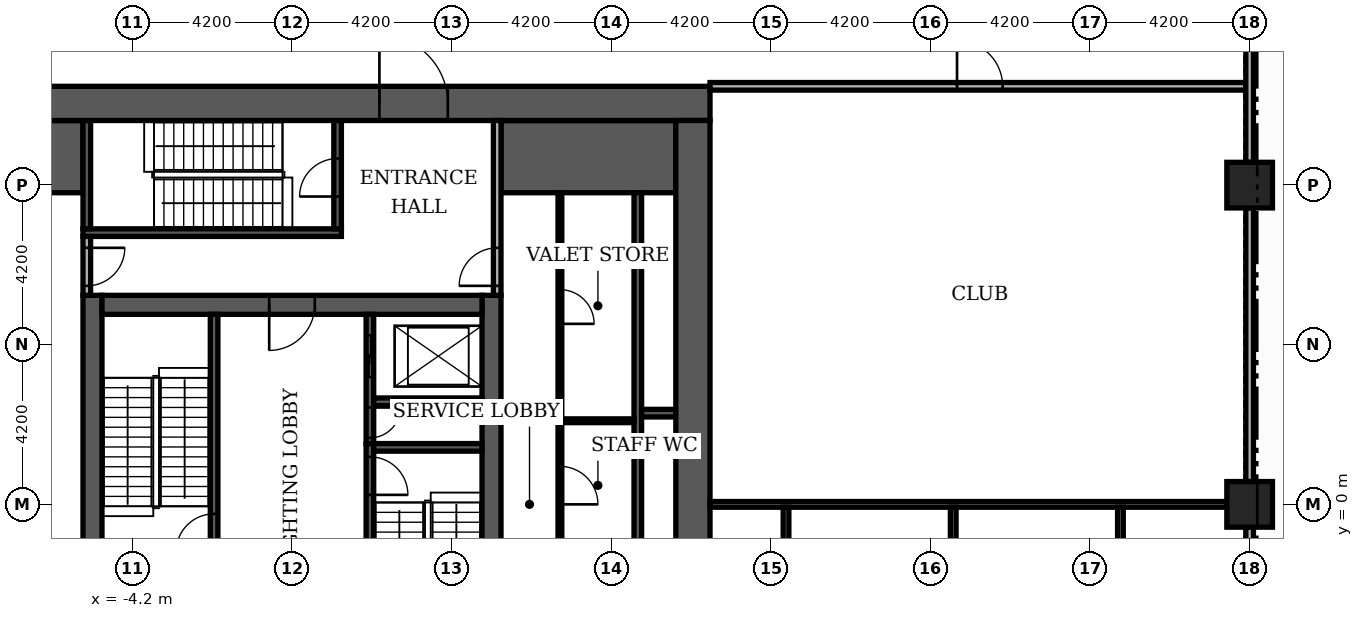
"""IFC4 building model, lengths in metres.
Left out: names, types, materials, properties, quantities, classifications, styles, units other than length and angle.
Written with IfcOpenShell. Run it as: python <this file> out.ifc"""

import sys

from ifc_helpers import new_model, si_unit, direction, frame, frame_2d, origin, origin_2d, place, context, subcontext, project, spatial, rectangle, extrude, element, fill, save


model = new_model("IFC4")
c1 = context("Model", 3, precision=1e-05, world=origin(), true_north=direction((0.0, 1.0)))
c2 = subcontext(c1, "Body", "Model", "MODEL_VIEW")
j1 = project(units=[si_unit("LENGTHUNIT", "METRE"), si_unit("PLANEANGLEUNIT", "RADIAN")], contexts=[c1])
p1 = place(None, origin())
s1 = spatial("IfcSite", under=j1, at=p1, CompositionType="ELEMENT")
p2 = place(p1, origin())
s2 = spatial("IfcBuilding", under=s1, at=p2, CompositionType="ELEMENT")
p3 = place(p2, frame((0.0, 0.0, 7.2)))
s3 = spatial("IfcBuildingStorey", under=s2, at=p3, CompositionType="ELEMENT", Elevation=7.2)
for number, where, z_axis, x_axis in (
    (1, (-5.25, -5.0, 0.0), (0.0, 0.0, 1.0), (0.0, 1.0, 0.0)),
    (2, (5.25, -5.0, 0.0), (0.0, 0.0, 1.0), (0.0, 1.0, 0.0)),
):
    element("IfcWall", number, at=place(p3, frame(where, z_axis=z_axis, x_axis=x_axis)), inside=s3, PredefinedType="SHEAR", context=c2, shape_type="SweptSolid", body=[
        extrude(rectangle(XDim=10.5, YDim=0.5, at=frame_2d((5.25, 0.0))), origin(), (0.0, 0.0, 1.0), 4.38),
    ])
p4 = place(p3, frame((-5.0, 5.25, 0.0), z_axis=(0.0, 0.0, 1.0), x_axis=(1.0, 0.0, 0.0)))
e3 = element("IfcWall", 3, at=p4, inside=s3, PredefinedType="SHEAR", context=c2, shape_type="SweptSolid", body=[
    extrude(rectangle(XDim=10.0, YDim=0.5, at=frame_2d((5.0, 0.0))), origin(), (0.0, 0.0, 1.0), 4.38),
])
p5 = place(p4, frame((4.4, 0.0, 0.0)))
e4 = element("IfcOpeningElement", 4, at=p5, cuts=e3, PredefinedType="OPENING", context=c2, shape_type="SweptSolid", body=[
    extrude(rectangle(XDim=1.2, YDim=2.1, at=frame_2d((0.6, 1.05))), frame((0.0, 0.26, 0.0), z_axis=(0.0, -1.0, 0.0), x_axis=(1.0, 0.0, 0.0)), (0.0, 0.0, 1.0), 0.52),
])
for number, where, z_axis, x_axis in (
    (5, (-10.1, 9.15, 0.0), (0.0, 0.0, 1.0), (1.0, 0.0, 0.0)),
    (6, (5.5, 9.15, 0.0), (0.0, 0.0, 1.0), (1.0, 0.0, 0.0)),
):
    element("IfcWall", number, at=place(p3, frame(where, z_axis=z_axis, x_axis=x_axis)), inside=s3, PredefinedType="SHEAR", context=c2, shape_type="SweptSolid", body=[
        extrude(rectangle(XDim=4.6, YDim=1.9, at=frame_2d((2.3, 0.0))), origin(), (0.0, 0.0, 1.0), 4.38),
    ])
p6 = place(p3, frame((2.05, -5.0, 0.0), z_axis=(0.0, 0.0, 1.0), x_axis=(0.0, 1.0, 0.0)))
e7 = element("IfcWall", 7, at=p6, inside=s3, PredefinedType="SHEAR", context=c2, shape_type="SweptSolid", body=[
    extrude(rectangle(XDim=6.6, YDim=0.2, at=frame_2d((3.3, 0.0))), origin(), (0.0, 0.0, 1.0), 4.38),
])
p7 = place(p6, frame((5.25, 0.0, 0.0)))
e8 = element("IfcOpeningElement", 8, at=p7, cuts=e7, PredefinedType="OPENING", context=c2, shape_type="SweptSolid", body=[
    extrude(rectangle(XDim=1.0, YDim=2.1, at=frame_2d((0.5, 1.05))), frame((0.0, 0.11, 0.0), z_axis=(0.0, -1.0, 0.0), x_axis=(1.0, 0.0, 0.0)), (0.0, 0.0, 1.0), 0.22),
])
p8 = place(p3, frame((-2.05, -1.4, 0.0), z_axis=(0.0, 0.0, 1.0), x_axis=(0.0, 1.0, 0.0)))
e9 = element("IfcWall", 9, at=p8, inside=s3, PredefinedType="SHEAR", context=c2, shape_type="SweptSolid", body=[
    extrude(rectangle(XDim=6.4, YDim=0.2, at=frame_2d((3.2, 0.0))), origin(), (0.0, 0.0, 1.0), 4.38),
])
p9 = place(p8, frame((0.15, 0.0, 0.0)))
e10 = element("IfcOpeningElement", 10, at=p9, cuts=e9, PredefinedType="OPENING", context=c2, shape_type="SweptSolid", body=[
    extrude(rectangle(XDim=1.0, YDim=2.1, at=frame_2d((0.5, 1.05))), frame((0.0, 0.11, 0.0), z_axis=(0.0, -1.0, 0.0), x_axis=(1.0, 0.0, 0.0)), (0.0, 0.0, 1.0), 0.22),
])
p10 = place(p3, frame((2.15, 1.5, 0.0), z_axis=(0.0, 0.0, 1.0), x_axis=(1.0, 0.0, 0.0)))
e11 = element("IfcWall", 11, at=p10, inside=s3, PredefinedType="SHEAR", context=c2, shape_type="SweptSolid", body=[
    extrude(rectangle(XDim=2.85, YDim=0.2, at=frame_2d((1.425, 0.0))), origin(), (0.0, 0.0, 1.0), 4.38),
])
p11 = place(p3, frame((-5.5, 7.15, 0.0), z_axis=(0.0, 0.0, 1.0), x_axis=(1.0, 0.0, 0.0)))
e12 = element("IfcWall", 12, at=p11, inside=s3, PredefinedType="SHEAR", context=c2, shape_type="SweptSolid", body=[
    extrude(rectangle(XDim=6.8, YDim=0.2, at=frame_2d((3.4, 0.0))), origin(), (0.0, 0.0, 1.0), 4.38),
])
p12 = place(p3, frame((-5.4, 7.25, 0.0), z_axis=(0.0, 0.0, 1.0), x_axis=(0.0, 1.0, 0.0)))
e13 = element("IfcWall", 13, at=p12, inside=s3, PredefinedType="SHEAR", context=c2, shape_type="SweptSolid", body=[
    extrude(rectangle(XDim=2.85, YDim=0.2, at=frame_2d((1.425, 0.0))), origin(), (0.0, 0.0, 1.0), 4.38),
])
p13 = place(p3, frame((1.2, 7.25, 0.0), z_axis=(0.0, 0.0, 1.0), x_axis=(0.0, 1.0, 0.0)))
e14 = element("IfcWall", 14, at=p13, inside=s3, PredefinedType="SHEAR", context=c2, shape_type="SweptSolid", body=[
    extrude(rectangle(XDim=2.85, YDim=0.2, at=frame_2d((1.425, 0.0))), origin(), (0.0, 0.0, 1.0), 4.38),
])
p14 = place(p13, frame((0.85, 0.0, 0.0)))
e15 = element("IfcOpeningElement", 15, at=p14, cuts=e14, PredefinedType="OPENING", context=c2, shape_type="SweptSolid", body=[
    extrude(rectangle(XDim=1.0, YDim=2.1, at=frame_2d((0.5, 1.05))), frame((0.0, 0.11, 0.0), z_axis=(0.0, -1.0, 0.0), x_axis=(1.0, 0.0, 0.0)), (0.0, 0.0, 1.0), 0.22),
])
p15 = place(p3, frame((9.1, -8.2, 0.0), z_axis=(0.0, 0.0, 1.0), x_axis=(0.0, 1.0, 0.0)))
e16 = element("IfcWall", 16, at=p15, inside=s3, PredefinedType="SHEAR", context=c2, shape_type="SweptSolid", body=[
    extrude(rectangle(XDim=16.4, YDim=0.2, at=frame_2d((8.2, 0.0))), origin(), (0.0, 0.0, 1.0), 4.38),
])
p16 = place(p3, frame((2.05, 1.6, 0.0), z_axis=(0.0, 0.0, 1.0), x_axis=(0.0, 1.0, 0.0)))
e17 = element("IfcWall", 17, at=p16, inside=s3, PredefinedType="SHEAR", context=c2, shape_type="SweptSolid", body=[
    extrude(rectangle(XDim=3.4, YDim=0.2, at=frame_2d((1.7, 0.0))), origin(), (0.0, 0.0, 1.0), 4.38),
])
p17 = place(p16, frame((1.75, 0.0, 0.0)))
e18 = element("IfcOpeningElement", 18, at=p17, cuts=e17, PredefinedType="OPENING", context=c2, shape_type="SweptSolid", body=[
    extrude(rectangle(XDim=1.1, YDim=2.1, at=frame_2d((0.55, 1.05))), frame((0.0, 0.11, 0.0), z_axis=(0.0, -1.0, 0.0), x_axis=(1.0, 0.0, 0.0)), (0.0, 0.0, 1.0), 0.22),
])
p18 = place(p16, frame((0.15, 0.0, 0.0)))
e19 = element("IfcOpeningElement", 19, at=p18, cuts=e17, PredefinedType="OPENING", context=c2, shape_type="SweptSolid", body=[
    extrude(rectangle(XDim=0.8, YDim=2.1, at=frame_2d((0.4, 1.05))), frame((0.0, 0.11, 0.0), z_axis=(0.0, -1.0, 0.0), x_axis=(1.0, 0.0, 0.0)), (0.0, 0.0, 1.0), 0.22),
])
p19 = place(p3, frame((9.2, 2.4, 0.0), z_axis=(0.0, 0.0, 1.0), x_axis=(1.0, 0.0, 0.0)))
e20 = element("IfcWall", 20, at=p19, inside=s3, PredefinedType="SHEAR", context=c2, shape_type="SweptSolid", body=[
    extrude(rectangle(XDim=0.9, YDim=0.2, at=frame_2d((0.45, 0.0))), origin(), (0.0, 0.0, 1.0), 4.38),
])
p20 = place(p3, frame((2.15, 2.7, 0.0), z_axis=(0.0, 0.0, 1.0), x_axis=(1.0, 0.0, 0.0)))
e21 = element("IfcWall", 21, at=p20, inside=s3, PredefinedType="SHEAR", context=c2, shape_type="SweptSolid", body=[
    extrude(rectangle(XDim=2.85, YDim=0.2, at=frame_2d((1.425, 0.0))), origin(), (0.0, 0.0, 1.0), 4.38),
])
p21 = place(p3, frame((-11.0, 10.55, 0.0), z_axis=(0.0, 0.0, 1.0), x_axis=(1.0, 0.0, 0.0)))
e22 = element("IfcWall", 22, at=p21, inside=s3, PredefinedType="SHEAR", context=c2, shape_type="SweptSolid", body=[
    extrude(rectangle(XDim=22.0, YDim=0.9, at=frame_2d((11.0, 0.0))), origin(), (0.0, 0.0, 1.0), 4.38),
])
p22 = place(p21, frame((13.3, 0.0, 0.0)))
e23 = element("IfcOpeningElement", 23, at=p22, cuts=e22, PredefinedType="OPENING", context=c2, shape_type="SweptSolid", body=[
    extrude(rectangle(XDim=1.8, YDim=2.2, at=frame_2d((0.9, 1.1))), frame((0.0, 0.46, 0.0), z_axis=(0.0, -1.0, 0.0), x_axis=(1.0, 0.0, 0.0)), (0.0, 0.0, 1.0), 0.92),
])
p23 = place(p3, frame((10.55, -10.1, 0.0), z_axis=(0.0, 0.0, 1.0), x_axis=(0.0, 1.0, 0.0)))
e24 = element("IfcWall", 24, at=p23, inside=s3, PredefinedType="SHEAR", context=c2, shape_type="SweptSolid", body=[
    extrude(rectangle(XDim=20.2, YDim=0.9, at=frame_2d((10.1, 0.0))), origin(), (0.0, 0.0, 1.0), 4.38),
])
for number, where, z_axis, x_axis in (
    (25, (25.2, 0.0, 0.0), (0.0, 0.0, 1.0), (1.0, 0.0, 0.0)),
    (26, (25.2, 8.4, 0.0), (0.0, 0.0, 1.0), (1.0, 0.0, 0.0)),
):
    element("IfcColumn", number, at=place(p3, frame(where, z_axis=z_axis, x_axis=x_axis)), inside=s3, PredefinedType="COLUMN", context=c2, shape_type="SweptSolid", body=[
        extrude(rectangle(XDim=1.2, YDim=1.2, at=origin_2d()), origin(), (0.0, 0.0, 1.0), 4.8),
    ])
p24 = place(p3, frame((7.05, -8.2, 0.0), z_axis=(0.0, 0.0, 1.0), x_axis=(0.0, 1.0, 0.0)))
e27 = element("IfcWall", 27, at=p24, inside=s3, PredefinedType="PARTITIONING", context=c2, shape_type="SweptSolid", body=[
    extrude(rectangle(XDim=16.4, YDim=0.1, at=frame_2d((8.2, 0.0))), origin(), (0.0, 0.0, 1.0), 4.38),
])
p25 = place(p24, frame((0.95, 0.0, 0.0)))
e28 = element("IfcOpeningElement", 28, at=p25, cuts=e27, PredefinedType="OPENING", context=c2, shape_type="SweptSolid", body=[
    extrude(rectangle(XDim=0.9, YDim=2.1, at=frame_2d((0.45, 1.05))), frame((0.0, 0.06, 0.0), z_axis=(0.0, -1.0, 0.0), x_axis=(1.0, 0.0, 0.0)), (0.0, 0.0, 1.0), 0.12),
])
p26 = place(p24, frame((4.45, 0.0, 0.0)))
e29 = element("IfcOpeningElement", 29, at=p26, cuts=e27, PredefinedType="OPENING", context=c2, shape_type="SweptSolid", body=[
    extrude(rectangle(XDim=0.9, YDim=2.1, at=frame_2d((0.45, 1.05))), frame((0.0, 0.06, 0.0), z_axis=(0.0, -1.0, 0.0), x_axis=(1.0, 0.0, 0.0)), (0.0, 0.0, 1.0), 0.12),
])
p27 = place(p24, frame((8.2, 0.0, 0.0)))
e30 = element("IfcOpeningElement", 30, at=p27, cuts=e27, PredefinedType="OPENING", context=c2, shape_type="SweptSolid", body=[
    extrude(rectangle(XDim=1.0, YDim=2.1, at=frame_2d((0.5, 1.05))), frame((0.0, 0.06, 0.0), z_axis=(0.0, -1.0, 0.0), x_axis=(1.0, 0.0, 0.0)), (0.0, 0.0, 1.0), 0.12),
])
p28 = place(p24, frame((12.95, 0.0, 0.0)))
e31 = element("IfcOpeningElement", 31, at=p28, cuts=e27, PredefinedType="OPENING", context=c2, shape_type="SweptSolid", body=[
    extrude(rectangle(XDim=0.9, YDim=2.1, at=frame_2d((0.45, 1.05))), frame((0.0, 0.06, 0.0), z_axis=(0.0, -1.0, 0.0), x_axis=(1.0, 0.0, 0.0)), (0.0, 0.0, 1.0), 0.12),
])
p29 = place(p3, frame((7.1, 2.2, 0.0), z_axis=(0.0, 0.0, 1.0), x_axis=(1.0, 0.0, 0.0)))
e32 = element("IfcWall", 32, at=p29, inside=s3, PredefinedType="PARTITIONING", context=c2, shape_type="SweptSolid", body=[
    extrude(rectangle(XDim=1.9, YDim=0.1, at=frame_2d((0.95, 0.0))), origin(), (0.0, 0.0, 1.0), 4.38),
])
p30 = place(p3, frame((-5.4, 5.5, 0.0), z_axis=(0.0, 0.0, 1.0), x_axis=(0.0, 1.0, 0.0)))
e33 = element("IfcWall", 33, at=p30, inside=s3, PredefinedType="PARTITIONING", context=c2, shape_type="SweptSolid", body=[
    extrude(rectangle(XDim=1.55, YDim=0.2, at=frame_2d((0.775, 0.0))), origin(), (0.0, 0.0, 1.0), 4.38),
])
p31 = place(p30, frame((0.25, 0.0, 0.0)))
e34 = element("IfcOpeningElement", 34, at=p31, cuts=e33, PredefinedType="OPENING", context=c2, shape_type="SweptSolid", body=[
    extrude(rectangle(XDim=1.0, YDim=2.1, at=frame_2d((0.5, 1.05))), frame((0.0, 0.11, 0.0), z_axis=(0.0, -1.0, 0.0), x_axis=(1.0, 0.0, 0.0)), (0.0, 0.0, 1.0), 0.22),
])
p32 = place(p3, frame((5.4, 5.5, 0.0), z_axis=(0.0, 0.0, 1.0), x_axis=(0.0, 1.0, 0.0)))
e35 = element("IfcWall", 35, at=p32, inside=s3, PredefinedType="PARTITIONING", context=c2, shape_type="SweptSolid", body=[
    extrude(rectangle(XDim=4.6, YDim=0.2, at=frame_2d((2.3, 0.0))), origin(), (0.0, 0.0, 1.0), 4.38),
])
p33 = place(p32, frame((0.25, 0.0, 0.0)))
e36 = element("IfcOpeningElement", 36, at=p33, cuts=e35, PredefinedType="OPENING", context=c2, shape_type="SweptSolid", body=[
    extrude(rectangle(XDim=1.0, YDim=2.1, at=frame_2d((0.5, 1.05))), frame((0.0, 0.11, 0.0), z_axis=(0.0, -1.0, 0.0), x_axis=(1.0, 0.0, 0.0)), (0.0, 0.0, 1.0), 0.22),
])
p34 = place(p3, frame((11.0, 0.0, 0.0), z_axis=(0.0, 0.0, 1.0), x_axis=(1.0, 0.0, 0.0)))
e37 = element("IfcWall", 37, at=p34, inside=s3, PredefinedType="PARTITIONING", context=c2, shape_type="SweptSolid", body=[
    extrude(rectangle(XDim=13.6, YDim=0.15, at=frame_2d((6.8, 0.0))), origin(), (0.0, 0.0, 1.0), 4.38),
])
p35 = place(p3, frame((11.0, 11.0, 0.0), z_axis=(0.0, 0.0, 1.0), x_axis=(1.0, 0.0, 0.0)))
e38 = element("IfcWall", 38, at=p35, inside=s3, PredefinedType="PARTITIONING", context=c2, shape_type="SweptSolid", body=[
    extrude(rectangle(XDim=14.1, YDim=0.2, at=frame_2d((7.05, 0.0))), origin(), (0.0, 0.0, 1.0), 4.38),
])
p36 = place(p35, frame((6.5, 0.0, 0.0)))
e39 = element("IfcOpeningElement", 39, at=p36, cuts=e38, PredefinedType="OPENING", context=c2, shape_type="SweptSolid", body=[
    extrude(rectangle(XDim=1.2, YDim=2.2, at=frame_2d((0.6, 1.1))), frame((0.0, 0.11, 0.0), z_axis=(0.0, -1.0, 0.0), x_axis=(1.0, 0.0, 0.0)), (0.0, 0.0, 1.0), 0.22),
])
for number, where, z_axis, x_axis in (
    (40, (13.0, -8.325, 0.0), (0.0, 0.0, 1.0), (0.0, 1.0, 0.0)),
    (41, (17.4, -8.325, 0.0), (0.0, 0.0, 1.0), (0.0, 1.0, 0.0)),
    (42, (21.8, -8.325, 0.0), (0.0, 0.0, 1.0), (0.0, 1.0, 0.0)),
):
    element("IfcWall", number, at=place(p3, frame(where, z_axis=z_axis, x_axis=x_axis)), inside=s3, PredefinedType="PARTITIONING", context=c2, shape_type="SweptSolid", body=[
        extrude(rectangle(XDim=8.25, YDim=0.15, at=frame_2d((4.125, 0.0))), origin(), (0.0, 0.0, 1.0), 4.38),
    ])
for number, where, z_axis, x_axis in (
    (43, (25.2, -7.8, 0.0), (0.0, 0.0, 1.0), (0.0, 1.0, 0.0)),
    (44, (25.2, 0.6, 0.0), (0.0, 0.0, 1.0), (0.0, 1.0, 0.0)),
):
    element("IfcWall", number, at=place(p3, frame(where, z_axis=z_axis, x_axis=x_axis)), inside=s3, PredefinedType="PARTITIONING", context=c2, shape_type="SweptSolid", body=[
        extrude(rectangle(XDim=7.2, YDim=0.2, at=frame_2d((3.6, 0.0))), origin(), (0.0, 0.0, 1.0), 4.08),
    ])
p37 = place(p3, frame((25.2, 9.0, 0.0), z_axis=(0.0, 0.0, 1.0), x_axis=(0.0, 1.0, 0.0)))
e45 = element("IfcWall", 45, at=p37, inside=s3, PredefinedType="PARTITIONING", context=c2, shape_type="SweptSolid", body=[
    extrude(rectangle(XDim=7.2, YDim=0.2, at=frame_2d((3.6, 0.0))), origin(), (0.0, 0.0, 1.0), 4.08),
])
p38 = place(p37, frame((3.9, 0.0, 0.0)))
e46 = element("IfcOpeningElement", 46, at=p38, cuts=e45, PredefinedType="OPENING", context=c2, shape_type="SweptSolid", body=[
    extrude(rectangle(XDim=1.8, YDim=2.2, at=frame_2d((0.9, 1.1))), frame((0.0, 0.11, 0.0), z_axis=(0.0, -1.0, 0.0), x_axis=(1.0, 0.0, 0.0)), (0.0, 0.0, 1.0), 0.22),
])
p39 = place(p17, origin())
e47 = element("IfcDoor", 47, at=p39, inside=s3, OperationType="SLIDING_TO_LEFT", PredefinedType="DOOR", context=c2, shape_type="SweptSolid", body=[
    extrude(rectangle(XDim=1.1, YDim=2.1, at=frame_2d((0.55, 1.05))), frame((0.0, 0.025, 0.0), z_axis=(0.0, -1.0, 0.0), x_axis=(1.0, 0.0, 0.0)), (0.0, 0.0, 1.0), 0.05),
])
fill(e18, e47)
p40 = place(p9, origin())
e48 = element("IfcDoor", 48, at=p40, inside=s3, OperationType="SINGLE_SWING_LEFT", PredefinedType="DOOR", context=c2, shape_type="SweptSolid", body=[
    extrude(rectangle(XDim=1.0, YDim=2.1, at=frame_2d((0.5, 1.05))), frame((0.0, 0.025, 0.0), z_axis=(0.0, -1.0, 0.0), x_axis=(1.0, 0.0, 0.0)), (0.0, 0.0, 1.0), 0.05),
])
fill(e10, e48)
p41 = place(p7, frame((1.0, 0.0, 0.0), z_axis=(0.0, 0.0, 1.0), x_axis=(-1.0, 0.0, 0.0)))
e49 = element("IfcDoor", 49, at=p41, inside=s3, OperationType="SINGLE_SWING_LEFT", PredefinedType="DOOR", context=c2, shape_type="SweptSolid", body=[
    extrude(rectangle(XDim=1.0, YDim=2.1, at=frame_2d((0.5, 1.05))), frame((0.0, 0.025, 0.0), z_axis=(0.0, -1.0, 0.0), x_axis=(1.0, 0.0, 0.0)), (0.0, 0.0, 1.0), 0.05),
])
fill(e8, e49)
p42 = place(p18, frame((0.8, 0.0, 0.0), z_axis=(0.0, 0.0, 1.0), x_axis=(-1.0, 0.0, 0.0)))
e50 = element("IfcDoor", 50, at=p42, inside=s3, OperationType="SINGLE_SWING_RIGHT", PredefinedType="DOOR", context=c2, shape_type="SweptSolid", body=[
    extrude(rectangle(XDim=0.8, YDim=2.1, at=frame_2d((0.4, 1.05))), frame((0.0, 0.025, 0.0), z_axis=(0.0, -1.0, 0.0), x_axis=(1.0, 0.0, 0.0)), (0.0, 0.0, 1.0), 0.05),
])
fill(e19, e50)
p43 = place(p5, frame((1.2, 0.0, 0.0), z_axis=(0.0, 0.0, 1.0), x_axis=(-1.0, 0.0, 0.0)))
e51 = element("IfcDoor", 51, at=p43, inside=s3, OperationType="SINGLE_SWING_LEFT", PredefinedType="DOOR", context=c2, shape_type="SweptSolid", body=[
    extrude(rectangle(XDim=1.2, YDim=2.1, at=frame_2d((0.6, 1.05))), frame((0.0, 0.025, 0.0), z_axis=(0.0, -1.0, 0.0), x_axis=(1.0, 0.0, 0.0)), (0.0, 0.0, 1.0), 0.05),
])
fill(e4, e51)
p44 = place(p14, origin())
e52 = element("IfcDoor", 52, at=p44, inside=s3, OperationType="SINGLE_SWING_LEFT", PredefinedType="DOOR", context=c2, shape_type="SweptSolid", body=[
    extrude(rectangle(XDim=1.0, YDim=2.1, at=frame_2d((0.5, 1.05))), frame((0.0, 0.025, 0.0), z_axis=(0.0, -1.0, 0.0), x_axis=(1.0, 0.0, 0.0)), (0.0, 0.0, 1.0), 0.05),
])
fill(e15, e52)
p45 = place(p31, frame((1.0, 0.0, 0.0), z_axis=(0.0, 0.0, 1.0), x_axis=(-1.0, 0.0, 0.0)))
e53 = element("IfcDoor", 53, at=p45, inside=s3, OperationType="SINGLE_SWING_RIGHT", PredefinedType="DOOR", context=c2, shape_type="SweptSolid", body=[
    extrude(rectangle(XDim=1.0, YDim=2.1, at=frame_2d((0.5, 1.05))), frame((0.0, 0.025, 0.0), z_axis=(0.0, -1.0, 0.0), x_axis=(1.0, 0.0, 0.0)), (0.0, 0.0, 1.0), 0.05),
])
fill(e34, e53)
p46 = place(p33, origin())
e54 = element("IfcDoor", 54, at=p46, inside=s3, OperationType="SINGLE_SWING_LEFT", PredefinedType="DOOR", context=c2, shape_type="SweptSolid", body=[
    extrude(rectangle(XDim=1.0, YDim=2.1, at=frame_2d((0.5, 1.05))), frame((0.0, 0.025, 0.0), z_axis=(0.0, -1.0, 0.0), x_axis=(1.0, 0.0, 0.0)), (0.0, 0.0, 1.0), 0.05),
])
fill(e36, e54)
p47 = place(p22, origin())
e55 = element("IfcDoor", 55, at=p47, inside=s3, OperationType="DOUBLE_DOOR_SINGLE_SWING", PredefinedType="DOOR", context=c2, shape_type="SweptSolid", body=[
    extrude(rectangle(XDim=1.8, YDim=2.2, at=frame_2d((0.9, 1.1))), frame((0.0, 0.025, 0.0), z_axis=(0.0, -1.0, 0.0), x_axis=(1.0, 0.0, 0.0)), (0.0, 0.0, 1.0), 0.05),
])
fill(e23, e55)
p48 = place(p27, frame((1.0, 0.0, 0.0), z_axis=(0.0, 0.0, 1.0), x_axis=(-1.0, 0.0, 0.0)))
e56 = element("IfcDoor", 56, at=p48, inside=s3, OperationType="SINGLE_SWING_LEFT", PredefinedType="DOOR", context=c2, shape_type="SweptSolid", body=[
    extrude(rectangle(XDim=1.0, YDim=2.1, at=frame_2d((0.5, 1.05))), frame((0.0, 0.025, 0.0), z_axis=(0.0, -1.0, 0.0), x_axis=(1.0, 0.0, 0.0)), (0.0, 0.0, 1.0), 0.05),
])
fill(e30, e56)
p49 = place(p28, frame((0.9, 0.0, 0.0), z_axis=(0.0, 0.0, 1.0), x_axis=(-1.0, 0.0, 0.0)))
e57 = element("IfcDoor", 57, at=p49, inside=s3, OperationType="SINGLE_SWING_LEFT", PredefinedType="DOOR", context=c2, shape_type="SweptSolid", body=[
    extrude(rectangle(XDim=0.9, YDim=2.1, at=frame_2d((0.45, 1.05))), frame((0.0, 0.025, 0.0), z_axis=(0.0, -1.0, 0.0), x_axis=(1.0, 0.0, 0.0)), (0.0, 0.0, 1.0), 0.05),
])
fill(e31, e57)
p50 = place(p36, origin())
e58 = element("IfcDoor", 58, at=p50, inside=s3, OperationType="SINGLE_SWING_LEFT", PredefinedType="DOOR", context=c2, shape_type="SweptSolid", body=[
    extrude(rectangle(XDim=1.2, YDim=2.2, at=frame_2d((0.6, 1.1))), frame((0.0, 0.025, 0.0), z_axis=(0.0, -1.0, 0.0), x_axis=(1.0, 0.0, 0.0)), (0.0, 0.0, 1.0), 0.05),
])
fill(e39, e58)
save(model, sys.argv[1])
